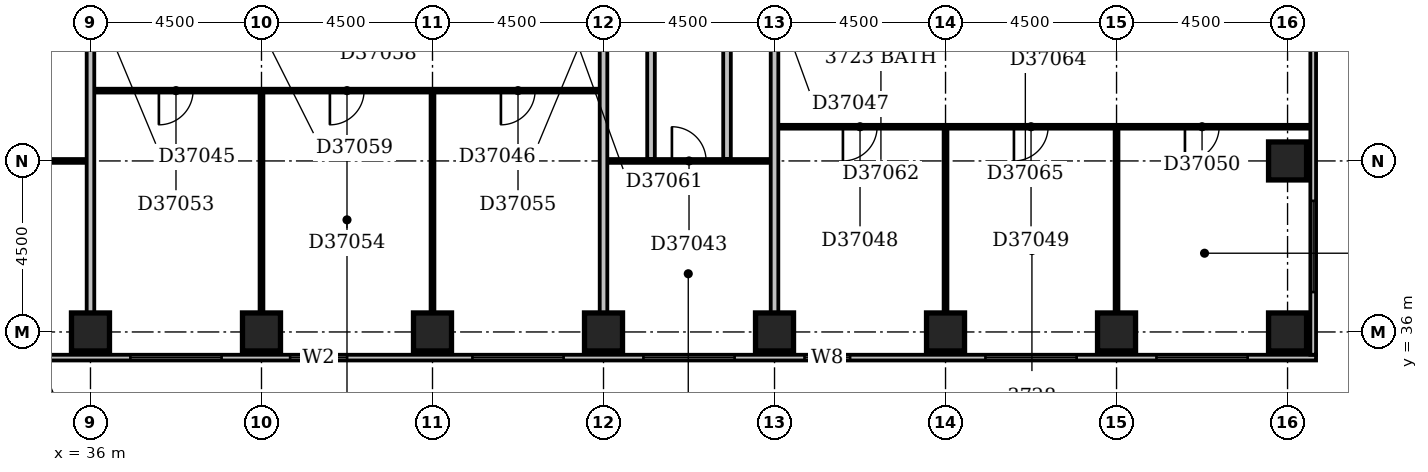
"""IFC4 building model, lengths in metres.
Left out: names, types, materials, properties, quantities, classifications, styles, units other than length and angle.
Written with IfcOpenShell. Run it as: python <this file> out.ifc"""

import sys

from ifc_helpers import new_model, si_unit, direction, frame, frame_2d, origin, origin_2d, place, context, subcontext, project, spatial, rectangle, extrude, element, fill, save


model = new_model("IFC4")
c1 = context("Model", 3, precision=1e-05, world=origin(), true_north=direction((0.0, 1.0)))
c2 = subcontext(c1, "Body", "Model", "MODEL_VIEW")
j1 = project(units=[si_unit("LENGTHUNIT", "METRE"), si_unit("PLANEANGLEUNIT", "RADIAN")], contexts=[c1])
p1 = place(None, origin())
s1 = spatial("IfcSite", under=j1, at=p1, CompositionType="ELEMENT")
p2 = place(p1, origin())
s2 = spatial("IfcBuilding", under=s1, at=p2, CompositionType="ELEMENT")
p3 = place(p2, frame((0.0, 0.0, 148.4)))
s3 = spatial("IfcBuildingStorey", under=s2, at=p3, CompositionType="ELEMENT", Elevation=148.4)
for number, where, z_axis, x_axis in (
    (1, (36.0, 36.0, -0.3), (0.0, 0.0, 1.0), (1.0, 0.0, 0.0)),
    (2, (40.5, 36.0, -0.3), (0.0, 0.0, 1.0), (1.0, 0.0, 0.0)),
    (3, (45.0, 36.0, -0.3), (0.0, 0.0, 1.0), (1.0, 0.0, 0.0)),
    (4, (49.5, 36.0, -0.3), (0.0, 0.0, 1.0), (1.0, 0.0, 0.0)),
    (5, (54.0, 36.0, -0.3), (0.0, 0.0, 1.0), (1.0, 0.0, 0.0)),
    (6, (58.5, 36.0, -0.3), (0.0, 0.0, 1.0), (1.0, 0.0, 0.0)),
    (7, (63.0, 36.0, -0.3), (0.0, 0.0, 1.0), (1.0, 0.0, 0.0)),
    (8, (67.5, 36.0, -0.3), (0.0, 0.0, 1.0), (1.0, 0.0, 0.0)),
    (9, (67.5, 40.5, -0.3), (0.0, 0.0, 1.0), (1.0, 0.0, 0.0)),
):
    element("IfcColumn", number, at=place(p3, frame(where, z_axis=z_axis, x_axis=x_axis)), inside=s3, PredefinedType="COLUMN", context=c2, shape_type="SweptSolid", body=[
        extrude(rectangle(XDim=1.0, YDim=1.0, at=origin_2d()), origin(), (0.0, 0.0, 1.0), 3.6),
    ])
p4 = place(p3, frame((23.1, 35.325, 0.0), z_axis=(0.0, 0.0, 1.0), x_axis=(1.0, 0.0, 0.0)))
e10 = element("IfcWall", 10, at=p4, inside=s3, PredefinedType="STANDARD", context=c2, shape_type="SweptSolid", body=[
    extrude(rectangle(XDim=45.15, YDim=0.15, at=frame_2d((22.575, 0.0))), origin(), (0.0, 0.0, 1.0), 2.7),
])
p5 = place(p4, frame((0.45, 0.0, 0.6)))
e11 = element("IfcOpeningElement", 11, at=p5, cuts=e10, PredefinedType="OPENING", context=c2, shape_type="SweptSolid", body=[
    extrude(rectangle(XDim=2.4, YDim=1.8, at=frame_2d((1.2, 0.9))), frame((0.0, 0.087, 0.0), z_axis=(0.0, -1.0, 0.0), x_axis=(1.0, 0.0, 0.0)), (0.0, 0.0, 1.0), 0.174),
])
p6 = place(p4, frame((6.711, 0.0, 0.6)))
e12 = element("IfcOpeningElement", 12, at=p6, cuts=e10, PredefinedType="OPENING", context=c2, shape_type="SweptSolid", body=[
    extrude(rectangle(XDim=0.9, YDim=1.8, at=frame_2d((0.45, 0.9))), frame((0.0, 0.087, 0.0), z_axis=(0.0, -1.0, 0.0), x_axis=(1.0, 0.0, 0.0)), (0.0, 0.0, 1.0), 0.174),
])
p7 = place(p4, frame((9.45, 0.0, 0.6)))
e13 = element("IfcOpeningElement", 13, at=p7, cuts=e10, PredefinedType="OPENING", context=c2, shape_type="SweptSolid", body=[
    extrude(rectangle(XDim=2.4, YDim=1.8, at=frame_2d((1.2, 0.9))), frame((0.0, 0.087, 0.0), z_axis=(0.0, -1.0, 0.0), x_axis=(1.0, 0.0, 0.0)), (0.0, 0.0, 1.0), 0.174),
])
p8 = place(p4, frame((13.95, 0.0, 0.6)))
e14 = element("IfcOpeningElement", 14, at=p8, cuts=e10, PredefinedType="OPENING", context=c2, shape_type="SweptSolid", body=[
    extrude(rectangle(XDim=2.4, YDim=1.8, at=frame_2d((1.2, 0.9))), frame((0.0, 0.087, 0.0), z_axis=(0.0, -1.0, 0.0), x_axis=(1.0, 0.0, 0.0)), (0.0, 0.0, 1.0), 0.174),
])
p9 = place(p4, frame((18.153, 0.0, 0.6)))
e15 = element("IfcOpeningElement", 15, at=p9, cuts=e10, PredefinedType="OPENING", context=c2, shape_type="SweptSolid", body=[
    extrude(rectangle(XDim=1.5, YDim=1.8, at=frame_2d((0.75, 0.9))), frame((0.0, 0.087, 0.0), z_axis=(0.0, -1.0, 0.0), x_axis=(1.0, 0.0, 0.0)), (0.0, 0.0, 1.0), 0.174),
])
p10 = place(p4, frame((22.95, 0.0, 0.6)))
e16 = element("IfcOpeningElement", 16, at=p10, cuts=e10, PredefinedType="OPENING", context=c2, shape_type="SweptSolid", body=[
    extrude(rectangle(XDim=2.4, YDim=1.8, at=frame_2d((1.2, 0.9))), frame((0.0, 0.087, 0.0), z_axis=(0.0, -1.0, 0.0), x_axis=(1.0, 0.0, 0.0)), (0.0, 0.0, 1.0), 0.174),
])
p11 = place(p4, frame((27.45, 0.0, 0.6)))
e17 = element("IfcOpeningElement", 17, at=p11, cuts=e10, PredefinedType="OPENING", context=c2, shape_type="SweptSolid", body=[
    extrude(rectangle(XDim=2.4, YDim=1.8, at=frame_2d((1.2, 0.9))), frame((0.0, 0.087, 0.0), z_axis=(0.0, -1.0, 0.0), x_axis=(1.0, 0.0, 0.0)), (0.0, 0.0, 1.0), 0.174),
])
p12 = place(p4, frame((31.689, 0.0, 0.6)))
e18 = element("IfcOpeningElement", 18, at=p12, cuts=e10, PredefinedType="OPENING", context=c2, shape_type="SweptSolid", body=[
    extrude(rectangle(XDim=1.2, YDim=1.8, at=frame_2d((0.6, 0.9))), frame((0.0, 0.087, 0.0), z_axis=(0.0, -1.0, 0.0), x_axis=(1.0, 0.0, 0.0)), (0.0, 0.0, 1.0), 0.174),
])
p13 = place(p4, frame((36.45, 0.0, 0.6)))
e19 = element("IfcOpeningElement", 19, at=p13, cuts=e10, PredefinedType="OPENING", context=c2, shape_type="SweptSolid", body=[
    extrude(rectangle(XDim=2.4, YDim=1.8, at=frame_2d((1.2, 0.9))), frame((0.0, 0.087, 0.0), z_axis=(0.0, -1.0, 0.0), x_axis=(1.0, 0.0, 0.0)), (0.0, 0.0, 1.0), 0.174),
])
p14 = place(p4, frame((40.95, 0.0, 0.6)))
e20 = element("IfcOpeningElement", 20, at=p14, cuts=e10, PredefinedType="OPENING", context=c2, shape_type="SweptSolid", body=[
    extrude(rectangle(XDim=2.4, YDim=1.8, at=frame_2d((1.2, 0.9))), frame((0.0, 0.087, 0.0), z_axis=(0.0, -1.0, 0.0), x_axis=(1.0, 0.0, 0.0)), (0.0, 0.0, 1.0), 0.174),
])
p15 = place(p3, frame((68.175, 35.4, 0.0), z_axis=(0.0, 0.0, 1.0), x_axis=(0.0, 1.0, 0.0)))
e21 = element("IfcWall", 21, at=p15, inside=s3, PredefinedType="STANDARD", context=c2, shape_type="SweptSolid", body=[
    extrude(rectangle(XDim=23.85, YDim=0.15, at=frame_2d((11.925, 0.0))), origin(), (0.0, 0.0, 1.0), 2.7),
])
p16 = place(p15, frame((1.65, 0.0, 0.6)))
e22 = element("IfcOpeningElement", 22, at=p16, cuts=e21, PredefinedType="OPENING", context=c2, shape_type="SweptSolid", body=[
    extrude(rectangle(XDim=2.4, YDim=1.8, at=frame_2d((1.2, 0.9))), frame((0.0, 0.087, 0.0), z_axis=(0.0, -1.0, 0.0), x_axis=(1.0, 0.0, 0.0)), (0.0, 0.0, 1.0), 0.174),
])
p17 = place(p15, frame((10.65, 0.0, 0.6)))
e23 = element("IfcOpeningElement", 23, at=p17, cuts=e21, PredefinedType="OPENING", context=c2, shape_type="SweptSolid", body=[
    extrude(rectangle(XDim=2.4, YDim=1.8, at=frame_2d((1.2, 0.9))), frame((0.0, 0.087, 0.0), z_axis=(0.0, -1.0, 0.0), x_axis=(1.0, 0.0, 0.0)), (0.0, 0.0, 1.0), 0.174),
])
p18 = place(p15, frame((19.973, 0.0, 0.6)))
e24 = element("IfcOpeningElement", 24, at=p18, cuts=e21, PredefinedType="OPENING", context=c2, shape_type="SweptSolid", body=[
    extrude(rectangle(XDim=2.4, YDim=1.8, at=frame_2d((1.2, 0.9))), frame((0.0, 0.087, 0.0), z_axis=(0.0, -1.0, 0.0), x_axis=(1.0, 0.0, 0.0)), (0.0, 0.0, 1.0), 0.174),
])
p19 = place(p3, frame((36.0, 36.5, 0.0), z_axis=(0.0, 0.0, 1.0), x_axis=(0.0, 1.0, 0.0)))
e25 = element("IfcWall", 25, at=p19, inside=s3, PredefinedType="PARTITIONING", context=c2, shape_type="SweptSolid", body=[
    extrude(rectangle(XDim=12.9, YDim=0.2, at=frame_2d((6.45, 0.0))), origin(), (0.0, 0.0, 1.0), 2.4),
])
p20 = place(p3, frame((40.5, 36.5, 0.0), z_axis=(0.0, 0.0, 1.0), x_axis=(0.0, 1.0, 0.0)))
e26 = element("IfcWall", 26, at=p20, inside=s3, PredefinedType="PARTITIONING", context=c2, shape_type="SweptSolid", body=[
    extrude(rectangle(XDim=5.8, YDim=0.1, at=frame_2d((2.9, 0.0))), origin(), (0.0, 0.0, 1.0), 3.3),
])
p21 = place(p3, frame((45.0, 36.5, 0.0), z_axis=(0.0, 0.0, 1.0), x_axis=(0.0, 1.0, 0.0)))
e27 = element("IfcWall", 27, at=p21, inside=s3, PredefinedType="PARTITIONING", context=c2, shape_type="SweptSolid", body=[
    extrude(rectangle(XDim=5.8, YDim=0.1, at=frame_2d((2.9, 0.0))), origin(), (0.0, 0.0, 1.0), 2.6),
])
p22 = place(p3, frame((49.5, 36.5, 0.0), z_axis=(0.0, 0.0, 1.0), x_axis=(0.0, 1.0, 0.0)))
e28 = element("IfcWall", 28, at=p22, inside=s3, PredefinedType="PARTITIONING", context=c2, shape_type="SweptSolid", body=[
    extrude(rectangle(XDim=12.9, YDim=0.2, at=frame_2d((6.45, 0.0))), origin(), (0.0, 0.0, 1.0), 3.3),
])
p23 = place(p3, frame((54.0, 36.5, 0.0), z_axis=(0.0, 0.0, 1.0), x_axis=(0.0, 1.0, 0.0)))
e29 = element("IfcWall", 29, at=p23, inside=s3, PredefinedType="PARTITIONING", context=c2, shape_type="SweptSolid", body=[
    extrude(rectangle(XDim=12.9, YDim=0.2, at=frame_2d((6.45, 0.0))), origin(), (0.0, 0.0, 1.0), 2.6),
])
p24 = place(p3, frame((58.5, 36.5, 0.0), z_axis=(0.0, 0.0, 1.0), x_axis=(0.0, 1.0, 0.0)))
e30 = element("IfcWall", 30, at=p24, inside=s3, PredefinedType="PARTITIONING", context=c2, shape_type="SweptSolid", body=[
    extrude(rectangle(XDim=4.85, YDim=0.1, at=frame_2d((2.425, 0.0))), origin(), (0.0, 0.0, 1.0), 3.3),
])
p25 = place(p3, frame((63.0, 36.5, 0.0), z_axis=(0.0, 0.0, 1.0), x_axis=(0.0, 1.0, 0.0)))
e31 = element("IfcWall", 31, at=p25, inside=s3, PredefinedType="PARTITIONING", context=c2, shape_type="SweptSolid", body=[
    extrude(rectangle(XDim=4.85, YDim=0.1, at=frame_2d((2.425, 0.0))), origin(), (0.0, 0.0, 1.0), 2.4),
])
p26 = place(p3, frame((31.6, 40.5, 0.0), z_axis=(0.0, 0.0, 1.0), x_axis=(1.0, 0.0, 0.0)))
e32 = element("IfcWall", 32, at=p26, inside=s3, PredefinedType="PARTITIONING", context=c2, shape_type="SweptSolid", body=[
    extrude(rectangle(XDim=4.3, YDim=0.1, at=frame_2d((2.15, 0.0))), origin(), (0.0, 0.0, 1.0), 3.3),
])
p27 = place(p26, frame((1.7, 0.0, 0.0)))
e33 = element("IfcOpeningElement", 33, at=p27, cuts=e32, PredefinedType="OPENING", context=c2, shape_type="SweptSolid", body=[
    extrude(rectangle(XDim=0.9, YDim=2.1, at=frame_2d((0.45, 1.05))), frame((0.0, 0.062, 0.0), z_axis=(0.0, -1.0, 0.0), x_axis=(1.0, 0.0, 0.0)), (0.0, 0.0, 1.0), 0.124),
])
p28 = place(p3, frame((49.6, 40.5, 0.0), z_axis=(0.0, 0.0, 1.0), x_axis=(1.0, 0.0, 0.0)))
e34 = element("IfcWall", 34, at=p28, inside=s3, PredefinedType="PARTITIONING", context=c2, shape_type="SweptSolid", body=[
    extrude(rectangle(XDim=4.3, YDim=0.1, at=frame_2d((2.15, 0.0))), origin(), (0.0, 0.0, 1.0), 3.3),
])
p29 = place(p28, frame((1.7, 0.0, 0.0)))
e35 = element("IfcOpeningElement", 35, at=p29, cuts=e34, PredefinedType="OPENING", context=c2, shape_type="SweptSolid", body=[
    extrude(rectangle(XDim=0.9, YDim=2.1, at=frame_2d((0.45, 1.05))), frame((0.0, 0.062, 0.0), z_axis=(0.0, -1.0, 0.0), x_axis=(1.0, 0.0, 0.0)), (0.0, 0.0, 1.0), 0.124),
])
p30 = place(p3, frame((50.75, 40.55, 0.0), z_axis=(0.0, 0.0, 1.0), x_axis=(0.0, 1.0, 0.0)))
e36 = element("IfcWall", 36, at=p30, inside=s3, PredefinedType="PARTITIONING", context=c2, shape_type="SweptSolid", body=[
    extrude(rectangle(XDim=8.95, YDim=0.2, at=frame_2d((4.475, 0.0))), origin(), (0.0, 0.0, 1.0), 3.3),
])
p31 = place(p30, frame((5.55, 0.0, 0.0)))
e37 = element("IfcOpeningElement", 37, at=p31, cuts=e36, PredefinedType="OPENING", context=c2, shape_type="SweptSolid", body=[
    extrude(rectangle(XDim=0.8, YDim=2.1, at=frame_2d((0.4, 1.05))), frame((0.0, 0.112, 0.0), z_axis=(0.0, -1.0, 0.0), x_axis=(1.0, 0.0, 0.0)), (0.0, 0.0, 1.0), 0.224),
])
p32 = place(p3, frame((52.75, 40.55, 0.0), z_axis=(0.0, 0.0, 1.0), x_axis=(0.0, 1.0, 0.0)))
e38 = element("IfcWall", 38, at=p32, inside=s3, PredefinedType="PARTITIONING", context=c2, shape_type="SweptSolid", body=[
    extrude(rectangle(XDim=8.95, YDim=0.2, at=frame_2d((4.475, 0.0))), origin(), (0.0, 0.0, 1.0), 3.3),
])
p33 = place(p32, frame((5.55, 0.0, 0.0)))
e39 = element("IfcOpeningElement", 39, at=p33, cuts=e38, PredefinedType="OPENING", context=c2, shape_type="SweptSolid", body=[
    extrude(rectangle(XDim=0.8, YDim=2.1, at=frame_2d((0.4, 1.05))), frame((0.0, 0.112, 0.0), z_axis=(0.0, -1.0, 0.0), x_axis=(1.0, 0.0, 0.0)), (0.0, 0.0, 1.0), 0.224),
])
p34 = place(p3, frame((54.1, 41.4, 0.0), z_axis=(0.0, 0.0, 1.0), x_axis=(1.0, 0.0, 0.0)))
e40 = element("IfcWall", 40, at=p34, inside=s3, PredefinedType="PARTITIONING", context=c2, shape_type="SweptSolid", body=[
    extrude(rectangle(XDim=14.0, YDim=0.1, at=frame_2d((7.0, 0.0))), origin(), (0.0, 0.0, 1.0), 3.3),
])
p35 = place(p34, frame((1.7, 0.0, 0.0)))
e41 = element("IfcOpeningElement", 41, at=p35, cuts=e40, PredefinedType="OPENING", context=c2, shape_type="SweptSolid", body=[
    extrude(rectangle(XDim=0.9, YDim=2.1, at=frame_2d((0.45, 1.05))), frame((0.0, 0.062, 0.0), z_axis=(0.0, -1.0, 0.0), x_axis=(1.0, 0.0, 0.0)), (0.0, 0.0, 1.0), 0.124),
])
p36 = place(p34, frame((6.2, 0.0, 0.0)))
e42 = element("IfcOpeningElement", 42, at=p36, cuts=e40, PredefinedType="OPENING", context=c2, shape_type="SweptSolid", body=[
    extrude(rectangle(XDim=0.9, YDim=2.1, at=frame_2d((0.45, 1.05))), frame((0.0, 0.062, 0.0), z_axis=(0.0, -1.0, 0.0), x_axis=(1.0, 0.0, 0.0)), (0.0, 0.0, 1.0), 0.124),
])
p37 = place(p34, frame((10.7, 0.0, 0.0)))
e43 = element("IfcOpeningElement", 43, at=p37, cuts=e40, PredefinedType="OPENING", context=c2, shape_type="SweptSolid", body=[
    extrude(rectangle(XDim=0.9, YDim=2.1, at=frame_2d((0.45, 1.05))), frame((0.0, 0.062, 0.0), z_axis=(0.0, -1.0, 0.0), x_axis=(1.0, 0.0, 0.0)), (0.0, 0.0, 1.0), 0.124),
])
p38 = place(p3, frame((36.1, 42.35, 0.0), z_axis=(0.0, 0.0, 1.0), x_axis=(1.0, 0.0, 0.0)))
e44 = element("IfcWall", 44, at=p38, inside=s3, PredefinedType="PARTITIONING", context=c2, shape_type="SweptSolid", body=[
    extrude(rectangle(XDim=13.3, YDim=0.1, at=frame_2d((6.65, 0.0))), origin(), (0.0, 0.0, 1.0), 3.3),
])
p39 = place(p38, frame((1.7, 0.0, 0.0)))
e45 = element("IfcOpeningElement", 45, at=p39, cuts=e44, PredefinedType="OPENING", context=c2, shape_type="SweptSolid", body=[
    extrude(rectangle(XDim=0.9, YDim=2.1, at=frame_2d((0.45, 1.05))), frame((0.0, 0.062, 0.0), z_axis=(0.0, -1.0, 0.0), x_axis=(1.0, 0.0, 0.0)), (0.0, 0.0, 1.0), 0.124),
])
p40 = place(p38, frame((6.2, 0.0, 0.0)))
e46 = element("IfcOpeningElement", 46, at=p40, cuts=e44, PredefinedType="OPENING", context=c2, shape_type="SweptSolid", body=[
    extrude(rectangle(XDim=0.9, YDim=2.1, at=frame_2d((0.45, 1.05))), frame((0.0, 0.062, 0.0), z_axis=(0.0, -1.0, 0.0), x_axis=(1.0, 0.0, 0.0)), (0.0, 0.0, 1.0), 0.124),
])
p41 = place(p38, frame((10.7, 0.0, 0.0)))
e47 = element("IfcOpeningElement", 47, at=p41, cuts=e44, PredefinedType="OPENING", context=c2, shape_type="SweptSolid", body=[
    extrude(rectangle(XDim=0.9, YDim=2.1, at=frame_2d((0.45, 1.05))), frame((0.0, 0.062, 0.0), z_axis=(0.0, -1.0, 0.0), x_axis=(1.0, 0.0, 0.0)), (0.0, 0.0, 1.0), 0.124),
])
p42 = place(p8, origin())
e48 = element("IfcWindow", 48, at=p42, inside=s3, PartitioningType="SINGLE_PANEL", PredefinedType="WINDOW", context=c2, shape_type="SweptSolid", body=[
    extrude(rectangle(XDim=2.4, YDim=1.8, at=frame_2d((1.2, 0.9))), frame((0.0, 0.03, 0.0), z_axis=(0.0, -1.0, 0.0), x_axis=(1.0, 0.0, 0.0)), (0.0, 0.0, 1.0), 0.06),
])
fill(e14, e48)
p43 = place(p9, origin())
e49 = element("IfcWindow", 49, at=p43, inside=s3, PartitioningType="SINGLE_PANEL", PredefinedType="WINDOW", context=c2, shape_type="SweptSolid", body=[
    extrude(rectangle(XDim=1.5, YDim=1.8, at=frame_2d((0.75, 0.9))), frame((0.0, 0.03, 0.0), z_axis=(0.0, -1.0, 0.0), x_axis=(1.0, 0.0, 0.0)), (0.0, 0.0, 1.0), 0.06),
])
fill(e15, e49)
p44 = place(p10, origin())
e50 = element("IfcWindow", 50, at=p44, inside=s3, PartitioningType="SINGLE_PANEL", PredefinedType="WINDOW", context=c2, shape_type="SweptSolid", body=[
    extrude(rectangle(XDim=2.4, YDim=1.8, at=frame_2d((1.2, 0.9))), frame((0.0, 0.03, 0.0), z_axis=(0.0, -1.0, 0.0), x_axis=(1.0, 0.0, 0.0)), (0.0, 0.0, 1.0), 0.06),
])
fill(e16, e50)
p45 = place(p11, origin())
e51 = element("IfcWindow", 51, at=p45, inside=s3, PartitioningType="SINGLE_PANEL", PredefinedType="WINDOW", context=c2, shape_type="SweptSolid", body=[
    extrude(rectangle(XDim=2.4, YDim=1.8, at=frame_2d((1.2, 0.9))), frame((0.0, 0.03, 0.0), z_axis=(0.0, -1.0, 0.0), x_axis=(1.0, 0.0, 0.0)), (0.0, 0.0, 1.0), 0.06),
])
fill(e17, e51)
p46 = place(p12, origin())
e52 = element("IfcWindow", 52, at=p46, inside=s3, PartitioningType="SINGLE_PANEL", PredefinedType="WINDOW", context=c2, shape_type="SweptSolid", body=[
    extrude(rectangle(XDim=1.2, YDim=1.8, at=frame_2d((0.6, 0.9))), frame((0.0, 0.03, 0.0), z_axis=(0.0, -1.0, 0.0), x_axis=(1.0, 0.0, 0.0)), (0.0, 0.0, 1.0), 0.06),
])
fill(e18, e52)
p47 = place(p13, origin())
e53 = element("IfcWindow", 53, at=p47, inside=s3, PartitioningType="SINGLE_PANEL", PredefinedType="WINDOW", context=c2, shape_type="SweptSolid", body=[
    extrude(rectangle(XDim=2.4, YDim=1.8, at=frame_2d((1.2, 0.9))), frame((0.0, 0.03, 0.0), z_axis=(0.0, -1.0, 0.0), x_axis=(1.0, 0.0, 0.0)), (0.0, 0.0, 1.0), 0.06),
])
fill(e19, e53)
p48 = place(p14, origin())
e54 = element("IfcWindow", 54, at=p48, inside=s3, PartitioningType="SINGLE_PANEL", PredefinedType="WINDOW", context=c2, shape_type="SweptSolid", body=[
    extrude(rectangle(XDim=2.4, YDim=1.8, at=frame_2d((1.2, 0.9))), frame((0.0, 0.03, 0.0), z_axis=(0.0, -1.0, 0.0), x_axis=(1.0, 0.0, 0.0)), (0.0, 0.0, 1.0), 0.06),
])
fill(e20, e54)
p49 = place(p16, origin())
e55 = element("IfcWindow", 55, at=p49, inside=s3, PartitioningType="SINGLE_PANEL", PredefinedType="WINDOW", context=c2, shape_type="SweptSolid", body=[
    extrude(rectangle(XDim=2.4, YDim=1.8, at=frame_2d((1.2, 0.9))), frame((0.0, 0.03, 0.0), z_axis=(0.0, -1.0, 0.0), x_axis=(1.0, 0.0, 0.0)), (0.0, 0.0, 1.0), 0.06),
])
fill(e22, e55)
p50 = place(p29, origin())
e56 = element("IfcDoor", 56, at=p50, inside=s3, OperationType="SINGLE_SWING_LEFT", PredefinedType="DOOR", context=c2, shape_type="SweptSolid", body=[
    extrude(rectangle(XDim=0.9, YDim=2.1, at=frame_2d((0.45, 1.05))), frame((0.0, 0.025, 0.0), z_axis=(0.0, -1.0, 0.0), x_axis=(1.0, 0.0, 0.0)), (0.0, 0.0, 1.0), 0.05),
])
fill(e35, e56)
p51 = place(p35, frame((0.9, 0.0, 0.0), z_axis=(0.0, 0.0, 1.0), x_axis=(-1.0, 0.0, 0.0)))
e57 = element("IfcDoor", 57, at=p51, inside=s3, OperationType="SINGLE_SWING_RIGHT", PredefinedType="DOOR", context=c2, shape_type="SweptSolid", body=[
    extrude(rectangle(XDim=0.9, YDim=2.1, at=frame_2d((0.45, 1.05))), frame((0.0, 0.025, 0.0), z_axis=(0.0, -1.0, 0.0), x_axis=(1.0, 0.0, 0.0)), (0.0, 0.0, 1.0), 0.05),
])
fill(e41, e57)
p52 = place(p36, frame((0.9, 0.0, 0.0), z_axis=(0.0, 0.0, 1.0), x_axis=(-1.0, 0.0, 0.0)))
e58 = element("IfcDoor", 58, at=p52, inside=s3, OperationType="SINGLE_SWING_RIGHT", PredefinedType="DOOR", context=c2, shape_type="SweptSolid", body=[
    extrude(rectangle(XDim=0.9, YDim=2.1, at=frame_2d((0.45, 1.05))), frame((0.0, 0.025, 0.0), z_axis=(0.0, -1.0, 0.0), x_axis=(1.0, 0.0, 0.0)), (0.0, 0.0, 1.0), 0.05),
])
fill(e42, e58)
p53 = place(p37, frame((0.9, 0.0, 0.0), z_axis=(0.0, 0.0, 1.0), x_axis=(-1.0, 0.0, 0.0)))
e59 = element("IfcDoor", 59, at=p53, inside=s3, OperationType="SINGLE_SWING_RIGHT", PredefinedType="DOOR", context=c2, shape_type="SweptSolid", body=[
    extrude(rectangle(XDim=0.9, YDim=2.1, at=frame_2d((0.45, 1.05))), frame((0.0, 0.025, 0.0), z_axis=(0.0, -1.0, 0.0), x_axis=(1.0, 0.0, 0.0)), (0.0, 0.0, 1.0), 0.05),
])
fill(e43, e59)
p54 = place(p39, frame((0.9, 0.0, 0.0), z_axis=(0.0, 0.0, 1.0), x_axis=(-1.0, 0.0, 0.0)))
e60 = element("IfcDoor", 60, at=p54, inside=s3, OperationType="SINGLE_SWING_RIGHT", PredefinedType="DOOR", context=c2, shape_type="SweptSolid", body=[
    extrude(rectangle(XDim=0.9, YDim=2.1, at=frame_2d((0.45, 1.05))), frame((0.0, 0.025, 0.0), z_axis=(0.0, -1.0, 0.0), x_axis=(1.0, 0.0, 0.0)), (0.0, 0.0, 1.0), 0.05),
])
fill(e45, e60)
p55 = place(p40, frame((0.9, 0.0, 0.0), z_axis=(0.0, 0.0, 1.0), x_axis=(-1.0, 0.0, 0.0)))
e61 = element("IfcDoor", 61, at=p55, inside=s3, OperationType="SINGLE_SWING_RIGHT", PredefinedType="DOOR", context=c2, shape_type="SweptSolid", body=[
    extrude(rectangle(XDim=0.9, YDim=2.1, at=frame_2d((0.45, 1.05))), frame((0.0, 0.025, 0.0), z_axis=(0.0, -1.0, 0.0), x_axis=(1.0, 0.0, 0.0)), (0.0, 0.0, 1.0), 0.05),
])
fill(e46, e61)
p56 = place(p41, frame((0.9, 0.0, 0.0), z_axis=(0.0, 0.0, 1.0), x_axis=(-1.0, 0.0, 0.0)))
e62 = element("IfcDoor", 62, at=p56, inside=s3, OperationType="SINGLE_SWING_RIGHT", PredefinedType="DOOR", context=c2, shape_type="SweptSolid", body=[
    extrude(rectangle(XDim=0.9, YDim=2.1, at=frame_2d((0.45, 1.05))), frame((0.0, 0.025, 0.0), z_axis=(0.0, -1.0, 0.0), x_axis=(1.0, 0.0, 0.0)), (0.0, 0.0, 1.0), 0.05),
])
fill(e47, e62)
save(model, sys.argv[1])
